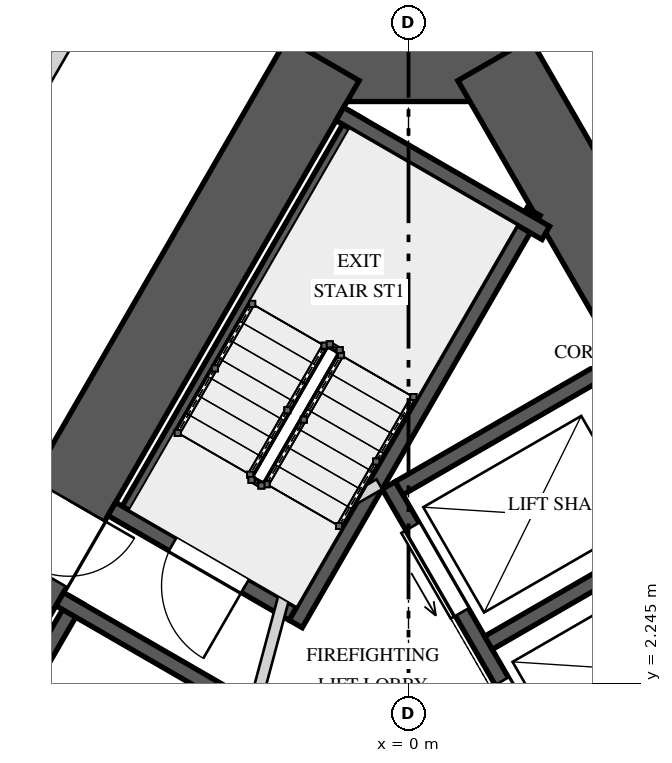
"""IFC4 building model, lengths in metres.
Left out: names, types, materials, properties, quantities, classifications, styles, units other than length and angle.
Written with IfcOpenShell. Run it as: python <this file> out.ifc"""

import sys

from ifc_helpers import new_model, si_unit, direction, frame, frame_2d, origin, place, context, subcontext, project, spatial, rectangle, extrude, element, fill, save


model = new_model("IFC4")
c1 = context("Model", 3, precision=1e-05, world=origin(), true_north=direction((0.0, 1.0)))
c2 = subcontext(c1, "Body", "Model", "MODEL_VIEW")
j1 = project(units=[si_unit("LENGTHUNIT", "METRE"), si_unit("PLANEANGLEUNIT", "RADIAN")], contexts=[c1])
p1 = place(None, origin())
s1 = spatial("IfcSite", under=j1, at=p1, CompositionType="ELEMENT")
p2 = place(p1, origin())
s2 = spatial("IfcBuilding", under=s1, at=p2, CompositionType="ELEMENT")
p3 = place(p2, frame((0.0, 0.0, 15.0)))
s3 = spatial("IfcBuildingStorey", under=s2, at=p3, CompositionType="ELEMENT", Elevation=15.0)
p4 = place(p3, frame((1.443, 10.45, 0.0), z_axis=(0.0, 0.0, 1.0), x_axis=(-1.0, 0.0, 0.0)))
e1 = element("IfcWall", 1, at=p4, inside=s3, PredefinedType="SHEAR", context=c2, shape_type="SweptSolid", body=[
    extrude(rectangle(XDim=2.887, YDim=1.1, at=frame_2d((1.443, 0.0))), origin(), (0.0, 0.0, 1.0), 5.0),
])
p5 = place(p3, frame((-1.126, 10.45, 0.0), z_axis=(0.0, 0.0, 1.0), x_axis=(-0.500001757713, -0.866024388966, 0.0)))
e2 = element("IfcWall", 2, at=p5, inside=s3, PredefinedType="SHEAR", context=c2, shape_type="SweptSolid", body=[
    extrude(rectangle(XDim=16.974, YDim=1.1, at=frame_2d((8.487, 0.0))), origin(), (0.0, 0.0, 1.0), 5.0),
])
p6 = place(p5, frame((6.692, 0.0, 0.0)))
e3 = element("IfcOpeningElement", 3, at=p6, cuts=e2, PredefinedType="OPENING", context=c2, shape_type="SweptSolid", body=[
    extrude(rectangle(XDim=1.0, YDim=2.4, at=frame_2d((0.5, 1.2))), frame((0.0, 0.56, 0.0), z_axis=(0.0, -1.0, 0.0), x_axis=(1.0, 0.0, 0.0)), (0.0, 0.0, 1.0), 1.12),
])
p7 = place(p5, frame((14.397, 0.0, 0.0)))
e4 = element("IfcOpeningElement", 4, at=p7, cuts=e2, PredefinedType="OPENING", context=c2, shape_type="SweptSolid", body=[
    extrude(rectangle(XDim=0.8, YDim=2.1, at=frame_2d((0.4, 1.05))), frame((0.0, 0.56, 0.0), z_axis=(0.0, -1.0, 0.0), x_axis=(1.0, 0.0, 0.0)), (0.0, 0.0, 1.0), 1.12),
])
p8 = place(p3, frame((9.613, -4.25, 0.0), z_axis=(0.0, 0.0, 1.0), x_axis=(-0.500001757713, 0.866024388966, 0.0)))
e5 = element("IfcWall", 5, at=p8, inside=s3, PredefinedType="SHEAR", context=c2, shape_type="SweptSolid", body=[
    extrude(rectangle(XDim=16.974, YDim=1.1, at=frame_2d((8.487, 0.0))), origin(), (0.0, 0.0, 1.0), 5.0),
])
p9 = place(p8, frame((6.762, 0.0, 0.0)))
e6 = element("IfcOpeningElement", 6, at=p9, cuts=e5, PredefinedType="OPENING", context=c2, shape_type="SweptSolid", body=[
    extrude(rectangle(XDim=1.0, YDim=2.4, at=frame_2d((0.5, 1.2))), frame((0.0, 0.56, 0.0), z_axis=(0.0, -1.0, 0.0), x_axis=(1.0, 0.0, 0.0)), (0.0, 0.0, 1.0), 1.12),
])
p10 = place(p3, frame((-0.68, 9.722, 0.0), z_axis=(0.0, 0.0, 1.0), x_axis=(-0.49998037582, -0.866036733513, 0.0)))
e7 = element("IfcWall", 7, at=p10, inside=s3, PredefinedType="SOLIDWALL", context=c2, shape_type="SweptSolid", body=[
    extrude(rectangle(XDim=6.2, YDim=0.2, at=frame_2d((3.1, 0.0))), origin(), (0.0, 0.0, 1.0), 4.65),
])
p11 = place(p3, frame((1.646, 8.45, 0.0), z_axis=(0.0, 0.0, 1.0), x_axis=(-0.500006002103, -0.866021938441, 0.0)))
e8 = element("IfcWall", 8, at=p11, inside=s3, PredefinedType="SOLIDWALL", context=c2, shape_type="SweptSolid", body=[
    extrude(rectangle(XDim=6.261, YDim=0.2, at=frame_2d((3.13, 0.0))), origin(), (0.0, 0.0, 1.0), 4.65),
])
p12 = place(p3, frame((1.806, 8.172, 0.0), z_axis=(0.0, 0.0, 1.0), x_axis=(-0.866054327916, 0.499949898588, 0.0)))
e9 = element("IfcWall", 9, at=p12, inside=s3, PredefinedType="SOLIDWALL", context=c2, shape_type="SweptSolid", body=[
    extrude(rectangle(XDim=3.128, YDim=0.2, at=frame_2d((1.564, 0.0))), origin(), (0.0, 0.0, 1.0), 4.65),
])
p13 = place(p3, frame((-1.521, 3.165, 0.0), z_axis=(0.0, 0.0, 1.0), x_axis=(-0.866027397988, 0.499996545922, 0.0)))
e10 = element("IfcWall", 10, at=p13, inside=s3, PredefinedType="SOLIDWALL", context=c2, shape_type="SweptSolid", body=[
    extrude(rectangle(XDim=2.75, YDim=0.2, at=frame_2d((1.375, 0.0))), origin(), (0.0, 0.0, 1.0), 4.65),
])
p14 = place(p13, frame((0.725, 0.0, 0.0)))
e11 = element("IfcOpeningElement", 11, at=p14, cuts=e10, PredefinedType="OPENING", context=c2, shape_type="SweptSolid", body=[
    extrude(rectangle(XDim=1.1, YDim=2.4, at=frame_2d((0.55, 1.2))), frame((0.0, 0.11, 0.0), z_axis=(0.0, -1.0, 0.0), x_axis=(1.0, 0.0, 0.0)), (0.0, 0.0, 1.0), 0.22),
])
p15 = place(p3, frame((-4.365, 3.34, 0.0), z_axis=(0.0, 0.0, 1.0), x_axis=(-0.499996545922, -0.866027397988, 0.0)))
e12 = element("IfcWall", 12, at=p15, inside=s3, PredefinedType="SOLIDWALL", context=c2, shape_type="SweptSolid", body=[
    extrude(rectangle(XDim=5.5, YDim=0.2, at=frame_2d((2.75, 0.0))), origin(), (0.0, 0.0, 1.0), 4.65),
])
p16 = place(p3, frame((-2.38, 2.078, 0.0), z_axis=(0.0, 0.0, 1.0), x_axis=(-0.866054858364, 0.499948979701, 0.0)))
e13 = element("IfcWall", 13, at=p16, inside=s3, PredefinedType="SOLIDWALL", context=c2, shape_type="SweptSolid", body=[
    extrude(rectangle(XDim=2.55, YDim=0.2, at=frame_2d((1.275, 0.0))), origin(), (0.0, 0.0, 1.0), 4.65),
])
p17 = place(p3, frame((2.19, 0.606, 0.0), z_axis=(0.0, 0.0, 1.0), x_axis=(-0.500002801628, 0.866023786258, 0.0)))
e14 = element("IfcWall", 14, at=p17, inside=s3, PredefinedType="SOLIDWALL", context=c2, shape_type="SweptSolid", body=[
    extrude(rectangle(XDim=4.9, YDim=0.2, at=frame_2d((2.45, 0.0))), origin(), (0.0, 0.0, 1.0), 4.65),
])
p18 = place(p17, frame((0.625, 0.0, 0.0)))
e15 = element("IfcOpeningElement", 15, at=p18, cuts=e14, PredefinedType="OPENING", context=c2, shape_type="SweptSolid", body=[
    extrude(rectangle(XDim=1.3, YDim=2.1, at=frame_2d((0.65, 1.05))), frame((0.0, 0.11, 0.0), z_axis=(0.0, -1.0, 0.0), x_axis=(1.0, 0.0, 0.0)), (0.0, 0.0, 1.0), 0.22),
])
p19 = place(p17, frame((2.975, 0.0, 0.0)))
e16 = element("IfcOpeningElement", 16, at=p19, cuts=e14, PredefinedType="OPENING", context=c2, shape_type="SweptSolid", body=[
    extrude(rectangle(XDim=1.3, YDim=2.1, at=frame_2d((0.65, 1.05))), frame((0.0, 0.11, 0.0), z_axis=(0.0, -1.0, 0.0), x_axis=(1.0, 0.0, 0.0)), (0.0, 0.0, 1.0), 0.22),
])
p20 = place(p3, frame((2.227, 0.743, 0.0), z_axis=(0.0, 0.0, 1.0), x_axis=(0.866014461049, 0.500018952895, 0.0)))
e17 = element("IfcWall", 17, at=p20, inside=s3, PredefinedType="SOLIDWALL", context=c2, shape_type="SweptSolid", body=[
    extrude(rectangle(XDim=3.35, YDim=0.2, at=frame_2d((1.675, 0.0))), origin(), (0.0, 0.0, 1.0), 4.65),
])
p21 = place(p3, frame((1.052, 2.778, 0.0), z_axis=(0.0, 0.0, 1.0), x_axis=(0.866032680314, 0.499987396469, 0.0)))
e18 = element("IfcWall", 18, at=p21, inside=s3, PredefinedType="SOLIDWALL", context=c2, shape_type="SweptSolid", body=[
    extrude(rectangle(XDim=3.35, YDim=0.2, at=frame_2d((1.675, 0.0))), origin(), (0.0, 0.0, 1.0), 4.65),
])
p22 = place(p3, frame((-0.123, 4.813, 0.0), z_axis=(0.0, 0.0, 1.0), x_axis=(0.866014461049, 0.500018952895, 0.0)))
e19 = element("IfcWall", 19, at=p22, inside=s3, PredefinedType="SOLIDWALL", context=c2, shape_type="SweptSolid", body=[
    extrude(rectangle(XDim=3.35, YDim=0.2, at=frame_2d((1.675, 0.0))), origin(), (0.0, 0.0, 1.0), 4.65),
])
p23 = place(p3, frame((-2.178, 1.372, 0.0), z_axis=(0.0, 0.0, 1.0), x_axis=(0.258808958833, 0.96592852884, 0.0)))
e20 = element("IfcWall", 20, at=p23, inside=s3, PredefinedType="PARTITIONING", context=c2, shape_type="SweptSolid", body=[
    extrude(rectangle(XDim=2.903, YDim=0.15, at=frame_2d((1.451, 0.0))), origin(), (0.0, 0.0, 1.0), 4.65),
])
p24 = place(p3, frame((-1.51, 4.215, 0.0), z_axis=(0.0, 0.0, 1.0), x_axis=(0.866085525409, 0.49989585183, 0.0)))
e21 = element("IfcWall", 21, at=p24, inside=s3, PredefinedType="PARTITIONING", context=c2, shape_type="SweptSolid", body=[
    extrude(rectangle(XDim=1.3, YDim=0.15, at=frame_2d((0.65, 0.0))), origin(), (0.0, 0.0, 1.0), 4.65),
])
p25 = place(p3, frame((-4.812, 10.165, 0.0), z_axis=(0.0, 0.0, 1.0), x_axis=(0.500000186108, 0.866025296335, 0.0)))
e22 = element("IfcWall", 22, at=p25, inside=s3, PredefinedType="SOLIDWALL", context=c2, shape_type="SweptSolid", body=[
    extrude(rectangle(XDim=2.815, YDim=0.2, at=frame_2d((1.408, 0.0))), origin(), (0.0, 0.0, 1.0), 4.65),
])
p26 = place(p14, origin())
e23 = element("IfcDoor", 23, at=p26, inside=s3, OperationType="SINGLE_SWING_RIGHT", PredefinedType="DOOR", context=c2, shape_type="SweptSolid", body=[
    extrude(rectangle(XDim=1.1, YDim=2.4, at=frame_2d((0.55, 1.2))), frame((0.0, 0.025, 0.0), z_axis=(0.0, -1.0, 0.0), x_axis=(1.0, 0.0, 0.0)), (0.0, 0.0, 1.0), 0.05),
])
fill(e11, e23)
p27 = place(p18, origin())
e24 = element("IfcDoor", 24, at=p27, inside=s3, OperationType="SLIDING_TO_RIGHT", PredefinedType="DOOR", context=c2, shape_type="SweptSolid", body=[
    extrude(rectangle(XDim=1.3, YDim=2.1, at=frame_2d((0.65, 1.05))), frame((0.0, 0.025, 0.0), z_axis=(0.0, -1.0, 0.0), x_axis=(1.0, 0.0, 0.0)), (0.0, 0.0, 1.0), 0.05),
])
fill(e15, e24)
p28 = place(p19, origin())
e25 = element("IfcDoor", 25, at=p28, inside=s3, OperationType="SLIDING_TO_LEFT", PredefinedType="DOOR", context=c2, shape_type="SweptSolid", body=[
    extrude(rectangle(XDim=1.3, YDim=2.1, at=frame_2d((0.65, 1.05))), frame((0.0, 0.025, 0.0), z_axis=(0.0, -1.0, 0.0), x_axis=(1.0, 0.0, 0.0)), (0.0, 0.0, 1.0), 0.05),
])
fill(e16, e25)
p29 = place(p6, origin())
e26 = element("IfcDoor", 26, at=p29, inside=s3, OperationType="SINGLE_SWING_LEFT", PredefinedType="DOOR", context=c2, shape_type="SweptSolid", body=[
    extrude(rectangle(XDim=1.0, YDim=2.4, at=frame_2d((0.5, 1.2))), frame((0.0, 0.025, 0.0), z_axis=(0.0, -1.0, 0.0), x_axis=(1.0, 0.0, 0.0)), (0.0, 0.0, 1.0), 0.05),
])
fill(e3, e26)
save(model, sys.argv[1])
